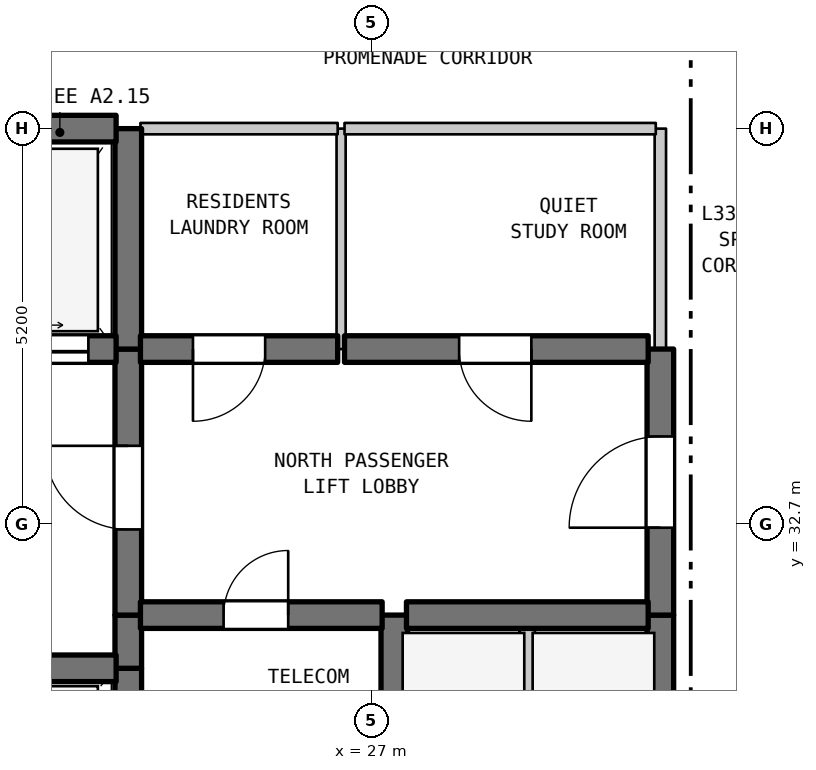
"""IFC4 building model, lengths in metres.
Left out: names, types, materials, properties, quantities, classifications, styles, units other than length and angle.
Written with IfcOpenShell. Run it as: python <this file> out.ifc"""

import sys

from ifc_helpers import new_model, si_unit, direction, frame, frame_2d, origin, place, context, subcontext, project, spatial, rectangle, extrude, element, fill, save


model = new_model("IFC4")
c1 = context("Model", 3, precision=1e-05, world=origin(), true_north=direction((0.0, 1.0)))
c2 = subcontext(c1, "Body", "Model", "MODEL_VIEW")
j1 = project(units=[si_unit("LENGTHUNIT", "METRE"), si_unit("PLANEANGLEUNIT", "RADIAN")], contexts=[c1])
p1 = place(None, origin())
s1 = spatial("IfcSite", under=j1, at=p1, CompositionType="ELEMENT")
p2 = place(p1, origin())
s2 = spatial("IfcBuilding", under=s1, at=p2, CompositionType="ELEMENT")
p3 = place(p2, frame((0.0, 0.0, 137.2)))
s3 = spatial("IfcBuildingStorey", under=s2, at=p3, CompositionType="ELEMENT", Elevation=137.2)
p4 = place(p3, frame((23.8, 29.5, 0.0), z_axis=(0.0, 0.0, 1.0), x_axis=(0.0, 1.0, 0.0)))
e1 = element("IfcWall", 1, at=p4, inside=s3, PredefinedType="SHEAR", context=c2, shape_type="SweptSolid", body=[
    extrude(rectangle(XDim=1.3, YDim=0.35, at=frame_2d((0.65, 0.0))), origin(), (0.0, 0.0, 1.0), 3.385),
])
p5 = place(p3, frame((23.8, 30.8, 0.0), z_axis=(0.0, 0.0, 1.0), x_axis=(0.0, 1.0, 0.0)))
e2 = element("IfcWall", 2, at=p5, inside=s3, PredefinedType="SHEAR", context=c2, shape_type="SweptSolid", body=[
    extrude(rectangle(XDim=0.7, YDim=0.35, at=frame_2d((0.35, 0.0))), origin(), (0.0, 0.0, 1.0), 3.385),
])
p6 = place(p3, frame((23.8, 31.5, 0.0), z_axis=(0.0, 0.0, 1.0), x_axis=(0.0, 1.0, 0.0)))
e3 = element("IfcWall", 3, at=p6, inside=s3, PredefinedType="SHEAR", context=c2, shape_type="SweptSolid", body=[
    extrude(rectangle(XDim=3.5, YDim=0.35, at=frame_2d((1.75, 0.0))), origin(), (0.0, 0.0, 1.0), 3.385),
])
p7 = place(p6, frame((1.127, 0.0, 0.0)))
e4 = element("IfcOpeningElement", 4, at=p7, cuts=e3, PredefinedType="OPENING", context=c2, shape_type="SweptSolid", body=[
    extrude(rectangle(XDim=1.1, YDim=2.15, at=frame_2d((0.55, 1.075))), frame((0.0, 0.185, 0.0), z_axis=(0.0, -1.0, 0.0), x_axis=(1.0, 0.0, 0.0)), (0.0, 0.0, 1.0), 0.37),
])
p8 = place(p3, frame((23.8, 35.0, 0.0), z_axis=(0.0, 0.0, 1.0), x_axis=(0.0, 1.0, 0.0)))
e5 = element("IfcWall", 5, at=p8, inside=s3, PredefinedType="SHEAR", context=c2, shape_type="SweptSolid", body=[
    extrude(rectangle(XDim=2.9, YDim=0.35, at=frame_2d((1.45, 0.0))), origin(), (0.0, 0.0, 1.0), 3.385),
])
p9 = place(p3, frame((26.6, 35.0, 0.0), z_axis=(0.0, 0.0, 1.0), x_axis=(0.0, 1.0, 0.0)))
e6 = element("IfcWall", 6, at=p9, inside=s3, PredefinedType="PARTITIONING", context=c2, shape_type="SweptSolid", body=[
    extrude(rectangle(XDim=2.9, YDim=0.12, at=frame_2d((1.45, 0.0))), origin(), (0.0, 0.0, 1.0), 3.385),
])
p10 = place(p3, frame((27.3, 29.5, 0.0), z_axis=(0.0, 0.0, 1.0), x_axis=(0.0, 1.0, 0.0)))
e7 = element("IfcWall", 7, at=p10, inside=s3, PredefinedType="SHEAR", context=c2, shape_type="SweptSolid", body=[
    extrude(rectangle(XDim=2.0, YDim=0.35, at=frame_2d((1.0, 0.0))), origin(), (0.0, 0.0, 1.0), 3.385),
])
p11 = place(p3, frame((29.05, 28.9, 0.0), z_axis=(0.0, 0.0, 1.0), x_axis=(0.0, 1.0, 0.0)))
e8 = element("IfcWall", 8, at=p11, inside=s3, PredefinedType="STANDARD", context=c2, shape_type="SweptSolid", body=[
    extrude(rectangle(XDim=2.6, YDim=0.2, at=frame_2d((1.3, 0.0))), origin(), (0.0, 0.0, 1.0), 3.385),
])
p12 = place(p3, frame((30.8, 28.9, 0.0), z_axis=(0.0, 0.0, 1.0), x_axis=(0.0, 1.0, 0.0)))
e9 = element("IfcWall", 9, at=p12, inside=s3, PredefinedType="SHEAR", context=c2, shape_type="SweptSolid", body=[
    extrude(rectangle(XDim=2.6, YDim=0.35, at=frame_2d((1.3, 0.0))), origin(), (0.0, 0.0, 1.0), 3.385),
])
p13 = place(p3, frame((30.8, 31.5, 0.0), z_axis=(0.0, 0.0, 1.0), x_axis=(0.0, 1.0, 0.0)))
e10 = element("IfcWall", 10, at=p13, inside=s3, PredefinedType="SHEAR", context=c2, shape_type="SweptSolid", body=[
    extrude(rectangle(XDim=3.5, YDim=0.35, at=frame_2d((1.75, 0.0))), origin(), (0.0, 0.0, 1.0), 3.385),
])
p14 = place(p13, frame((1.15, 0.0, 0.0)))
e11 = element("IfcOpeningElement", 11, at=p14, cuts=e10, PredefinedType="OPENING", context=c2, shape_type="SweptSolid", body=[
    extrude(rectangle(XDim=1.2, YDim=2.2, at=frame_2d((0.6, 1.1))), frame((0.0, 0.185, 0.0), z_axis=(0.0, -1.0, 0.0), x_axis=(1.0, 0.0, 0.0)), (0.0, 0.0, 1.0), 0.37),
])
p15 = place(p3, frame((30.8, 35.0, 0.0), z_axis=(0.0, 0.0, 1.0), x_axis=(0.0, 1.0, 0.0)))
e12 = element("IfcWall", 12, at=p15, inside=s3, PredefinedType="STANDARD", context=c2, shape_type="SweptSolid", body=[
    extrude(rectangle(XDim=2.9, YDim=0.15, at=frame_2d((1.45, 0.0))), origin(), (0.0, 0.0, 1.0), 3.385),
])
p16 = place(p3, frame((19.16, 30.8, 0.0), z_axis=(0.0, 0.0, 1.0), x_axis=(1.0, 0.0, 0.0)))
e13 = element("IfcWall", 13, at=p16, inside=s3, PredefinedType="SHEAR", context=c2, shape_type="SweptSolid", body=[
    extrude(rectangle(XDim=4.48, YDim=0.35, at=frame_2d((2.24, 0.0))), origin(), (0.0, 0.0, 1.0), 3.385),
])
p17 = place(p3, frame((23.96, 31.5, 0.0), z_axis=(0.0, 0.0, 1.0), x_axis=(1.0, 0.0, 0.0)))
e14 = element("IfcWall", 14, at=p17, inside=s3, PredefinedType="SHEAR", context=c2, shape_type="SweptSolid", body=[
    extrude(rectangle(XDim=3.18, YDim=0.35, at=frame_2d((1.59, 0.0))), origin(), (0.0, 0.0, 1.0), 3.385),
])
p18 = place(p17, frame((1.094, 0.0, 0.0)))
e15 = element("IfcOpeningElement", 15, at=p18, cuts=e14, PredefinedType="OPENING", context=c2, shape_type="SweptSolid", body=[
    extrude(rectangle(XDim=0.85, YDim=2.1, at=frame_2d((0.425, 1.05))), frame((0.0, 0.185, 0.0), z_axis=(0.0, -1.0, 0.0), x_axis=(1.0, 0.0, 0.0)), (0.0, 0.0, 1.0), 0.37),
])
p19 = place(p3, frame((27.46, 31.5, 0.0), z_axis=(0.0, 0.0, 1.0), x_axis=(1.0, 0.0, 0.0)))
e16 = element("IfcWall", 16, at=p19, inside=s3, PredefinedType="SHEAR", context=c2, shape_type="SweptSolid", body=[
    extrude(rectangle(XDim=3.18, YDim=0.35, at=frame_2d((1.59, 0.0))), origin(), (0.0, 0.0, 1.0), 3.385),
])
p20 = place(p3, frame((19.16, 35.0, 0.0), z_axis=(0.0, 0.0, 1.0), x_axis=(1.0, 0.0, 0.0)))
e17 = element("IfcWall", 17, at=p20, inside=s3, PredefinedType="SHEAR", context=c2, shape_type="SweptSolid", body=[
    extrude(rectangle(XDim=4.48, YDim=0.35, at=frame_2d((2.24, 0.0))), origin(), (0.0, 0.0, 1.0), 3.385),
])
p21 = place(p20, frame((0.365, 0.0, 0.0)))
e18 = element("IfcOpeningElement", 18, at=p21, cuts=e17, PredefinedType="OPENING", context=c2, shape_type="SweptSolid", body=[
    extrude(rectangle(XDim=1.35, YDim=2.2, at=frame_2d((0.675, 1.1))), frame((0.0, 0.185, 0.0), z_axis=(0.0, -1.0, 0.0), x_axis=(1.0, 0.0, 0.0)), (0.0, 0.0, 1.0), 0.37),
])
p22 = place(p20, frame((2.765, 0.0, 0.0)))
e19 = element("IfcOpeningElement", 19, at=p22, cuts=e17, PredefinedType="OPENING", context=c2, shape_type="SweptSolid", body=[
    extrude(rectangle(XDim=1.35, YDim=2.2, at=frame_2d((0.675, 1.1))), frame((0.0, 0.185, 0.0), z_axis=(0.0, -1.0, 0.0), x_axis=(1.0, 0.0, 0.0)), (0.0, 0.0, 1.0), 0.37),
])
p23 = place(p3, frame((23.96, 35.0, 0.0), z_axis=(0.0, 0.0, 1.0), x_axis=(1.0, 0.0, 0.0)))
e20 = element("IfcWall", 20, at=p23, inside=s3, PredefinedType="SHEAR", context=c2, shape_type="SweptSolid", body=[
    extrude(rectangle(XDim=2.595, YDim=0.35, at=frame_2d((1.297, 0.0))), origin(), (0.0, 0.0, 1.0), 3.385),
])
p24 = place(p23, frame((0.691, 0.0, 0.0)))
e21 = element("IfcOpeningElement", 21, at=p24, cuts=e20, PredefinedType="OPENING", context=c2, shape_type="SweptSolid", body=[
    extrude(rectangle(XDim=0.95, YDim=2.15, at=frame_2d((0.475, 1.075))), frame((0.0, 0.185, 0.0), z_axis=(0.0, -1.0, 0.0), x_axis=(1.0, 0.0, 0.0)), (0.0, 0.0, 1.0), 0.37),
])
p25 = place(p3, frame((26.645, 35.0, 0.0), z_axis=(0.0, 0.0, 1.0), x_axis=(1.0, 0.0, 0.0)))
e22 = element("IfcWall", 22, at=p25, inside=s3, PredefinedType="SHEAR", context=c2, shape_type="SweptSolid", body=[
    extrude(rectangle(XDim=3.995, YDim=0.35, at=frame_2d((1.998, 0.0))), origin(), (0.0, 0.0, 1.0), 3.385),
])
p26 = place(p25, frame((1.508, 0.0, 0.0)))
e23 = element("IfcOpeningElement", 23, at=p26, cuts=e22, PredefinedType="OPENING", context=c2, shape_type="SweptSolid", body=[
    extrude(rectangle(XDim=0.95, YDim=2.15, at=frame_2d((0.475, 1.075))), frame((0.0, 0.185, 0.0), z_axis=(0.0, -1.0, 0.0), x_axis=(1.0, 0.0, 0.0)), (0.0, 0.0, 1.0), 0.37),
])
p27 = place(p3, frame((19.16, 37.9, 0.0), z_axis=(0.0, 0.0, 1.0), x_axis=(1.0, 0.0, 0.0)))
e24 = element("IfcWall", 24, at=p27, inside=s3, PredefinedType="SHEAR", context=c2, shape_type="SweptSolid", body=[
    extrude(rectangle(XDim=4.48, YDim=0.35, at=frame_2d((2.24, 0.0))), origin(), (0.0, 0.0, 1.0), 3.385),
])
p28 = place(p3, frame((23.96, 37.9, 0.0), z_axis=(0.0, 0.0, 1.0), x_axis=(1.0, 0.0, 0.0)))
e25 = element("IfcWall", 25, at=p28, inside=s3, PredefinedType="STANDARD", context=c2, shape_type="SweptSolid", body=[
    extrude(rectangle(XDim=2.595, YDim=0.15, at=frame_2d((1.297, 0.0))), origin(), (0.0, 0.0, 1.0), 2.885),
])
p29 = place(p3, frame((26.645, 37.9, 0.0), z_axis=(0.0, 0.0, 1.0), x_axis=(1.0, 0.0, 0.0)))
e26 = element("IfcWall", 26, at=p29, inside=s3, PredefinedType="STANDARD", context=c2, shape_type="SweptSolid", body=[
    extrude(rectangle(XDim=4.095, YDim=0.15, at=frame_2d((2.047, 0.0))), origin(), (0.0, 0.0, 1.0), 2.885),
])
p30 = place(p7, origin())
e27 = element("IfcDoor", 27, at=p30, inside=s3, OperationType="SINGLE_SWING_RIGHT", PredefinedType="DOOR", context=c2, shape_type="SweptSolid", body=[
    extrude(rectangle(XDim=1.1, YDim=2.15, at=frame_2d((0.55, 1.075))), frame((0.0, 0.025, 0.0), z_axis=(0.0, -1.0, 0.0), x_axis=(1.0, 0.0, 0.0)), (0.0, 0.0, 1.0), 0.05),
])
fill(e4, e27)
p31 = place(p14, origin())
e28 = element("IfcDoor", 28, at=p31, inside=s3, OperationType="SINGLE_SWING_LEFT", PredefinedType="DOOR", context=c2, shape_type="SweptSolid", body=[
    extrude(rectangle(XDim=1.2, YDim=2.2, at=frame_2d((0.6, 1.1))), frame((0.0, 0.025, 0.0), z_axis=(0.0, -1.0, 0.0), x_axis=(1.0, 0.0, 0.0)), (0.0, 0.0, 1.0), 0.05),
])
fill(e11, e28)
p32 = place(p18, origin())
e29 = element("IfcDoor", 29, at=p32, inside=s3, OperationType="SINGLE_SWING_RIGHT", PredefinedType="DOOR", context=c2, shape_type="SweptSolid", body=[
    extrude(rectangle(XDim=0.85, YDim=2.1, at=frame_2d((0.425, 1.05))), frame((0.0, 0.025, 0.0), z_axis=(0.0, -1.0, 0.0), x_axis=(1.0, 0.0, 0.0)), (0.0, 0.0, 1.0), 0.05),
])
fill(e15, e29)
p33 = place(p22, origin())
e30 = element("IfcDoor", 30, at=p33, inside=s3, OperationType="DOUBLE_DOOR_SLIDING", PredefinedType="DOOR", context=c2, shape_type="SweptSolid", body=[
    extrude(rectangle(XDim=1.35, YDim=2.2, at=frame_2d((0.675, 1.1))), frame((0.0, 0.025, 0.0), z_axis=(0.0, -1.0, 0.0), x_axis=(1.0, 0.0, 0.0)), (0.0, 0.0, 1.0), 0.05),
])
fill(e19, e30)
p34 = place(p24, frame((0.95, 0.0, 0.0), z_axis=(0.0, 0.0, 1.0), x_axis=(-1.0, 0.0, 0.0)))
e31 = element("IfcDoor", 31, at=p34, inside=s3, OperationType="SINGLE_SWING_LEFT", PredefinedType="DOOR", context=c2, shape_type="SweptSolid", body=[
    extrude(rectangle(XDim=0.95, YDim=2.15, at=frame_2d((0.475, 1.075))), frame((0.0, 0.025, 0.0), z_axis=(0.0, -1.0, 0.0), x_axis=(1.0, 0.0, 0.0)), (0.0, 0.0, 1.0), 0.05),
])
fill(e21, e31)
p35 = place(p26, frame((0.95, 0.0, 0.0), z_axis=(0.0, 0.0, 1.0), x_axis=(-1.0, 0.0, 0.0)))
e32 = element("IfcDoor", 32, at=p35, inside=s3, OperationType="SINGLE_SWING_RIGHT", PredefinedType="DOOR", context=c2, shape_type="SweptSolid", body=[
    extrude(rectangle(XDim=0.95, YDim=2.15, at=frame_2d((0.475, 1.075))), frame((0.0, 0.025, 0.0), z_axis=(0.0, -1.0, 0.0), x_axis=(1.0, 0.0, 0.0)), (0.0, 0.0, 1.0), 0.05),
])
fill(e23, e32)
save(model, sys.argv[1])
